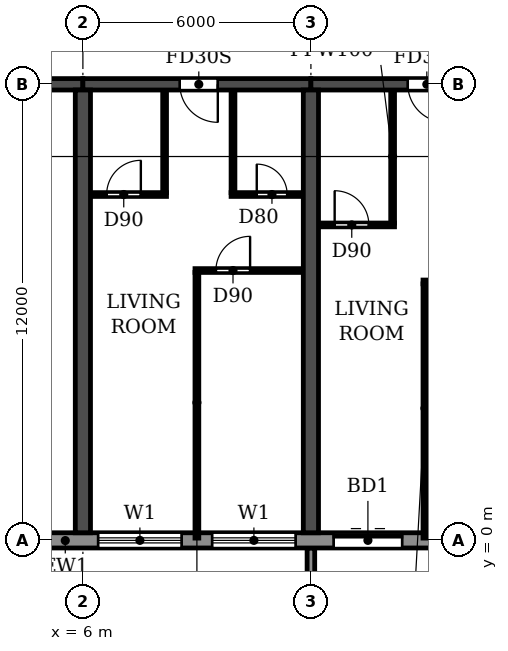
"""IFC4 building model, lengths in metres.
Left out: names, types, materials, properties, quantities, classifications, styles, units other than length and angle.
Written with IfcOpenShell. Run it as: python <this file> out.ifc"""

import sys

from ifc_helpers import new_model, si_unit, direction, frame, frame_2d, origin, place, context, subcontext, project, spatial, polyline, rectangle, outline, extrude, source, transform, mapped, element, fill, save


model = new_model("IFC4")
c1 = context("Model", 3, precision=1e-05, world=origin(), true_north=direction((0.0, 1.0)))
c2 = subcontext(c1, "Body", "Model", "MODEL_VIEW")
j1 = project(units=[si_unit("LENGTHUNIT", "METRE"), si_unit("PLANEANGLEUNIT", "RADIAN")], contexts=[c1])
p1 = place(None, origin())
s1 = spatial("IfcSite", under=j1, at=p1, CompositionType="ELEMENT")
p2 = place(p1, origin())
s2 = spatial("IfcBuilding", under=s1, at=p2, CompositionType="ELEMENT")
p3 = place(p2, frame((0.0, 0.0, 33.3)))
s3 = spatial("IfcBuildingStorey", under=s2, at=p3, CompositionType="ELEMENT", Elevation=33.3)
for number, where, z_axis, x_axis in (
    (1, (6.0, 0.2, 0.0), (0.0, 0.0, 1.0), (0.0, 1.0, 0.0)),
    (2, (12.0, 0.2, 0.0), (0.0, 0.0, 1.0), (0.0, 1.0, 0.0)),
):
    element("IfcWall", number, at=place(p3, frame(where, z_axis=z_axis, x_axis=x_axis)), inside=s3, PredefinedType="SHEAR", context=c2, shape_type="SweptSolid", body=[
        extrude(rectangle(XDim=11.65, YDim=0.4, at=frame_2d((5.825, 0.0))), origin(), (0.0, 0.0, 1.0), 3.05),
    ])
p4 = place(p3, frame((0.2, 12.0, 0.0), z_axis=(0.0, 0.0, 1.0), x_axis=(1.0, 0.0, 0.0)))
e3 = element("IfcWall", 3, at=p4, inside=s3, PredefinedType="SHEAR", context=c2, shape_type="SweptSolid", body=[
    extrude(rectangle(XDim=5.8, YDim=0.3, at=frame_2d((2.9, 0.0))), origin(), (0.0, 0.0, 1.0), 2.45),
])
p5 = place(p4, frame((2.3, 0.0, 0.0)))
e4 = element("IfcOpeningElement", 4, at=p5, cuts=e3, PredefinedType="OPENING", context=c2, shape_type="SweptSolid", body=[
    extrude(rectangle(XDim=1.0, YDim=2.1, at=frame_2d((0.5, 1.05))), frame((0.0, 0.16, 0.0), z_axis=(0.0, -1.0, 0.0), x_axis=(1.0, 0.0, 0.0)), (0.0, 0.0, 1.0), 0.32),
])
p6 = place(p3, frame((6.0, 12.0, 0.0), z_axis=(0.0, 0.0, 1.0), x_axis=(1.0, 0.0, 0.0)))
e5 = element("IfcWall", 5, at=p6, inside=s3, PredefinedType="SHEAR", context=c2, shape_type="SweptSolid", body=[
    extrude(rectangle(XDim=6.0, YDim=0.3, at=frame_2d((3.0, 0.0))), origin(), (0.0, 0.0, 1.0), 2.45),
])
p7 = place(p6, frame((2.55, 0.0, 0.0)))
e6 = element("IfcOpeningElement", 6, at=p7, cuts=e5, PredefinedType="OPENING", context=c2, shape_type="SweptSolid", body=[
    extrude(rectangle(XDim=1.0, YDim=2.1, at=frame_2d((0.5, 1.05))), frame((0.0, 0.16, 0.0), z_axis=(0.0, -1.0, 0.0), x_axis=(1.0, 0.0, 0.0)), (0.0, 0.0, 1.0), 0.32),
])
p8 = place(p3, frame((12.0, 12.0, 0.0), z_axis=(0.0, 0.0, 1.0), x_axis=(1.0, 0.0, 0.0)))
e7 = element("IfcWall", 7, at=p8, inside=s3, PredefinedType="SHEAR", context=c2, shape_type="SweptSolid", body=[
    extrude(rectangle(XDim=6.0, YDim=0.3, at=frame_2d((3.0, 0.0))), origin(), (0.0, 0.0, 1.0), 2.45),
])
p9 = place(p8, frame((2.55, 0.0, 0.0)))
e8 = element("IfcOpeningElement", 8, at=p9, cuts=e7, PredefinedType="OPENING", context=c2, shape_type="SweptSolid", body=[
    extrude(rectangle(XDim=1.0, YDim=2.1, at=frame_2d((0.5, 1.05))), frame((0.0, 0.16, 0.0), z_axis=(0.0, -1.0, 0.0), x_axis=(1.0, 0.0, 0.0)), (0.0, 0.0, 1.0), 0.32),
])
p10 = place(p3, frame((4.683, 0.0, 0.0), z_axis=(0.0, 0.0, 1.0), x_axis=(1.0, 0.0, 0.0)))
e9 = element("IfcWall", 9, at=p10, inside=s3, PredefinedType="STANDARD", context=c2, shape_type="SweptSolid", body=[
    extrude(rectangle(XDim=92.634, YDim=0.4, at=frame_2d((46.317, 0.0))), origin(), (0.0, 0.0, 1.0), 3.05),
])
p11 = place(p10, frame((1.717, 0.0, 0.9)))
e10 = element("IfcOpeningElement", 10, at=p11, cuts=e9, PredefinedType="OPENING", context=c2, shape_type="SweptSolid", body=[
    extrude(rectangle(XDim=2.2, YDim=1.5, at=frame_2d((1.1, 0.75))), frame((0.0, 0.21, 0.0), z_axis=(0.0, -1.0, 0.0), x_axis=(1.0, 0.0, 0.0)), (0.0, 0.0, 1.0), 0.42),
])
p12 = place(p10, frame((4.717, 0.0, 0.9)))
e11 = element("IfcOpeningElement", 11, at=p12, cuts=e9, PredefinedType="OPENING", context=c2, shape_type="SweptSolid", body=[
    extrude(rectangle(XDim=2.2, YDim=1.5, at=frame_2d((1.1, 0.75))), frame((0.0, 0.21, 0.0), z_axis=(0.0, -1.0, 0.0), x_axis=(1.0, 0.0, 0.0)), (0.0, 0.0, 1.0), 0.42),
])
p13 = place(p10, frame((7.917, 0.0, 0.0)))
e12 = element("IfcOpeningElement", 12, at=p13, cuts=e9, PredefinedType="OPENING", context=c2, shape_type="SweptSolid", body=[
    extrude(rectangle(XDim=1.8, YDim=2.4, at=frame_2d((0.9, 1.2))), frame((0.0, 0.21, 0.0), z_axis=(0.0, -1.0, 0.0), x_axis=(1.0, 0.0, 0.0)), (0.0, 0.0, 1.0), 0.42),
])
p14 = place(p10, frame((10.717, 0.0, 0.9)))
e13 = element("IfcOpeningElement", 13, at=p14, cuts=e9, PredefinedType="OPENING", context=c2, shape_type="SweptSolid", body=[
    extrude(rectangle(XDim=2.2, YDim=1.5, at=frame_2d((1.1, 0.75))), frame((0.0, 0.21, 0.0), z_axis=(0.0, -1.0, 0.0), x_axis=(1.0, 0.0, 0.0)), (0.0, 0.0, 1.0), 0.42),
])
p15 = place(p10, frame((13.717, 0.0, 0.9)))
e14 = element("IfcOpeningElement", 14, at=p15, cuts=e9, PredefinedType="OPENING", context=c2, shape_type="SweptSolid", body=[
    extrude(rectangle(XDim=2.2, YDim=1.5, at=frame_2d((1.1, 0.75))), frame((0.0, 0.21, 0.0), z_axis=(0.0, -1.0, 0.0), x_axis=(1.0, 0.0, 0.0)), (0.0, 0.0, 1.0), 0.42),
])
p16 = place(p10, frame((16.717, 0.0, 0.9)))
e15 = element("IfcOpeningElement", 15, at=p16, cuts=e9, PredefinedType="OPENING", context=c2, shape_type="SweptSolid", body=[
    extrude(rectangle(XDim=2.2, YDim=1.5, at=frame_2d((1.1, 0.75))), frame((0.0, 0.21, 0.0), z_axis=(0.0, -1.0, 0.0), x_axis=(1.0, 0.0, 0.0)), (0.0, 0.0, 1.0), 0.42),
])
p17 = place(p10, frame((19.717, 0.0, 0.9)))
e16 = element("IfcOpeningElement", 16, at=p17, cuts=e9, PredefinedType="OPENING", context=c2, shape_type="SweptSolid", body=[
    extrude(rectangle(XDim=2.2, YDim=1.5, at=frame_2d((1.1, 0.75))), frame((0.0, 0.21, 0.0), z_axis=(0.0, -1.0, 0.0), x_axis=(1.0, 0.0, 0.0)), (0.0, 0.0, 1.0), 0.42),
])
p18 = place(p10, frame((22.917, 0.0, 0.0)))
e17 = element("IfcOpeningElement", 17, at=p18, cuts=e9, PredefinedType="OPENING", context=c2, shape_type="SweptSolid", body=[
    extrude(rectangle(XDim=1.8, YDim=2.4, at=frame_2d((0.9, 1.2))), frame((0.0, 0.21, 0.0), z_axis=(0.0, -1.0, 0.0), x_axis=(1.0, 0.0, 0.0)), (0.0, 0.0, 1.0), 0.42),
])
p19 = place(p10, frame((25.717, 0.0, 0.9)))
e18 = element("IfcOpeningElement", 18, at=p19, cuts=e9, PredefinedType="OPENING", context=c2, shape_type="SweptSolid", body=[
    extrude(rectangle(XDim=2.2, YDim=1.5, at=frame_2d((1.1, 0.75))), frame((0.0, 0.21, 0.0), z_axis=(0.0, -1.0, 0.0), x_axis=(1.0, 0.0, 0.0)), (0.0, 0.0, 1.0), 0.42),
])
p20 = place(p10, frame((28.717, 0.0, 0.9)))
e19 = element("IfcOpeningElement", 19, at=p20, cuts=e9, PredefinedType="OPENING", context=c2, shape_type="SweptSolid", body=[
    extrude(rectangle(XDim=2.2, YDim=1.5, at=frame_2d((1.1, 0.75))), frame((0.0, 0.21, 0.0), z_axis=(0.0, -1.0, 0.0), x_axis=(1.0, 0.0, 0.0)), (0.0, 0.0, 1.0), 0.42),
])
p21 = place(p10, frame((31.717, 0.0, 0.9)))
e20 = element("IfcOpeningElement", 20, at=p21, cuts=e9, PredefinedType="OPENING", context=c2, shape_type="SweptSolid", body=[
    extrude(rectangle(XDim=2.2, YDim=1.5, at=frame_2d((1.1, 0.75))), frame((0.0, 0.21, 0.0), z_axis=(0.0, -1.0, 0.0), x_axis=(1.0, 0.0, 0.0)), (0.0, 0.0, 1.0), 0.42),
])
p22 = place(p10, frame((34.717, 0.0, 0.9)))
e21 = element("IfcOpeningElement", 21, at=p22, cuts=e9, PredefinedType="OPENING", context=c2, shape_type="SweptSolid", body=[
    extrude(rectangle(XDim=2.2, YDim=1.5, at=frame_2d((1.1, 0.75))), frame((0.0, 0.21, 0.0), z_axis=(0.0, -1.0, 0.0), x_axis=(1.0, 0.0, 0.0)), (0.0, 0.0, 1.0), 0.42),
])
p23 = place(p10, frame((37.717, 0.0, 0.9)))
e22 = element("IfcOpeningElement", 22, at=p23, cuts=e9, PredefinedType="OPENING", context=c2, shape_type="SweptSolid", body=[
    extrude(rectangle(XDim=2.2, YDim=1.5, at=frame_2d((1.1, 0.75))), frame((0.0, 0.21, 0.0), z_axis=(0.0, -1.0, 0.0), x_axis=(1.0, 0.0, 0.0)), (0.0, 0.0, 1.0), 0.42),
])
p24 = place(p10, frame((40.717, 0.0, 0.9)))
e23 = element("IfcOpeningElement", 23, at=p24, cuts=e9, PredefinedType="OPENING", context=c2, shape_type="SweptSolid", body=[
    extrude(rectangle(XDim=2.2, YDim=1.5, at=frame_2d((1.1, 0.75))), frame((0.0, 0.21, 0.0), z_axis=(0.0, -1.0, 0.0), x_axis=(1.0, 0.0, 0.0)), (0.0, 0.0, 1.0), 0.42),
])
p25 = place(p10, frame((43.717, 0.0, 0.9)))
e24 = element("IfcOpeningElement", 24, at=p25, cuts=e9, PredefinedType="OPENING", context=c2, shape_type="SweptSolid", body=[
    extrude(rectangle(XDim=2.2, YDim=1.5, at=frame_2d((1.1, 0.75))), frame((0.0, 0.21, 0.0), z_axis=(0.0, -1.0, 0.0), x_axis=(1.0, 0.0, 0.0)), (0.0, 0.0, 1.0), 0.42),
])
p26 = place(p10, frame((46.917, 0.0, 0.0)))
e25 = element("IfcOpeningElement", 25, at=p26, cuts=e9, PredefinedType="OPENING", context=c2, shape_type="SweptSolid", body=[
    extrude(rectangle(XDim=1.8, YDim=2.4, at=frame_2d((0.9, 1.2))), frame((0.0, 0.21, 0.0), z_axis=(0.0, -1.0, 0.0), x_axis=(1.0, 0.0, 0.0)), (0.0, 0.0, 1.0), 0.42),
])
p27 = place(p10, frame((49.717, 0.0, 0.9)))
e26 = element("IfcOpeningElement", 26, at=p27, cuts=e9, PredefinedType="OPENING", context=c2, shape_type="SweptSolid", body=[
    extrude(rectangle(XDim=2.2, YDim=1.5, at=frame_2d((1.1, 0.75))), frame((0.0, 0.21, 0.0), z_axis=(0.0, -1.0, 0.0), x_axis=(1.0, 0.0, 0.0)), (0.0, 0.0, 1.0), 0.42),
])
p28 = place(p10, frame((52.717, 0.0, 0.9)))
e27 = element("IfcOpeningElement", 27, at=p28, cuts=e9, PredefinedType="OPENING", context=c2, shape_type="SweptSolid", body=[
    extrude(rectangle(XDim=2.2, YDim=1.5, at=frame_2d((1.1, 0.75))), frame((0.0, 0.21, 0.0), z_axis=(0.0, -1.0, 0.0), x_axis=(1.0, 0.0, 0.0)), (0.0, 0.0, 1.0), 0.42),
])
p29 = place(p10, frame((55.717, 0.0, 0.9)))
e28 = element("IfcOpeningElement", 28, at=p29, cuts=e9, PredefinedType="OPENING", context=c2, shape_type="SweptSolid", body=[
    extrude(rectangle(XDim=2.2, YDim=1.5, at=frame_2d((1.1, 0.75))), frame((0.0, 0.21, 0.0), z_axis=(0.0, -1.0, 0.0), x_axis=(1.0, 0.0, 0.0)), (0.0, 0.0, 1.0), 0.42),
])
p30 = place(p10, frame((58.917, 0.0, 0.0)))
e29 = element("IfcOpeningElement", 29, at=p30, cuts=e9, PredefinedType="OPENING", context=c2, shape_type="SweptSolid", body=[
    extrude(rectangle(XDim=1.8, YDim=2.4, at=frame_2d((0.9, 1.2))), frame((0.0, 0.21, 0.0), z_axis=(0.0, -1.0, 0.0), x_axis=(1.0, 0.0, 0.0)), (0.0, 0.0, 1.0), 0.42),
])
p31 = place(p10, frame((61.717, 0.0, 0.9)))
e30 = element("IfcOpeningElement", 30, at=p31, cuts=e9, PredefinedType="OPENING", context=c2, shape_type="SweptSolid", body=[
    extrude(rectangle(XDim=2.2, YDim=1.5, at=frame_2d((1.1, 0.75))), frame((0.0, 0.21, 0.0), z_axis=(0.0, -1.0, 0.0), x_axis=(1.0, 0.0, 0.0)), (0.0, 0.0, 1.0), 0.42),
])
p32 = place(p10, frame((64.717, 0.0, 0.9)))
e31 = element("IfcOpeningElement", 31, at=p32, cuts=e9, PredefinedType="OPENING", context=c2, shape_type="SweptSolid", body=[
    extrude(rectangle(XDim=2.2, YDim=1.5, at=frame_2d((1.1, 0.75))), frame((0.0, 0.21, 0.0), z_axis=(0.0, -1.0, 0.0), x_axis=(1.0, 0.0, 0.0)), (0.0, 0.0, 1.0), 0.42),
])
p33 = place(p10, frame((67.717, 0.0, 0.9)))
e32 = element("IfcOpeningElement", 32, at=p33, cuts=e9, PredefinedType="OPENING", context=c2, shape_type="SweptSolid", body=[
    extrude(rectangle(XDim=2.2, YDim=1.5, at=frame_2d((1.1, 0.75))), frame((0.0, 0.21, 0.0), z_axis=(0.0, -1.0, 0.0), x_axis=(1.0, 0.0, 0.0)), (0.0, 0.0, 1.0), 0.42),
])
p34 = place(p10, frame((70.917, 0.0, 0.0)))
e33 = element("IfcOpeningElement", 33, at=p34, cuts=e9, PredefinedType="OPENING", context=c2, shape_type="SweptSolid", body=[
    extrude(rectangle(XDim=1.8, YDim=2.4, at=frame_2d((0.9, 1.2))), frame((0.0, 0.21, 0.0), z_axis=(0.0, -1.0, 0.0), x_axis=(1.0, 0.0, 0.0)), (0.0, 0.0, 1.0), 0.42),
])
p35 = place(p10, frame((73.717, 0.0, 0.9)))
e34 = element("IfcOpeningElement", 34, at=p35, cuts=e9, PredefinedType="OPENING", context=c2, shape_type="SweptSolid", body=[
    extrude(rectangle(XDim=2.2, YDim=1.5, at=frame_2d((1.1, 0.75))), frame((0.0, 0.21, 0.0), z_axis=(0.0, -1.0, 0.0), x_axis=(1.0, 0.0, 0.0)), (0.0, 0.0, 1.0), 0.42),
])
p36 = place(p10, frame((76.717, 0.0, 0.9)))
e35 = element("IfcOpeningElement", 35, at=p36, cuts=e9, PredefinedType="OPENING", context=c2, shape_type="SweptSolid", body=[
    extrude(rectangle(XDim=2.2, YDim=1.5, at=frame_2d((1.1, 0.75))), frame((0.0, 0.21, 0.0), z_axis=(0.0, -1.0, 0.0), x_axis=(1.0, 0.0, 0.0)), (0.0, 0.0, 1.0), 0.42),
])
p37 = place(p10, frame((79.717, 0.0, 0.9)))
e36 = element("IfcOpeningElement", 36, at=p37, cuts=e9, PredefinedType="OPENING", context=c2, shape_type="SweptSolid", body=[
    extrude(rectangle(XDim=2.2, YDim=1.5, at=frame_2d((1.1, 0.75))), frame((0.0, 0.21, 0.0), z_axis=(0.0, -1.0, 0.0), x_axis=(1.0, 0.0, 0.0)), (0.0, 0.0, 1.0), 0.42),
])
p38 = place(p10, frame((82.717, 0.0, 0.9)))
e37 = element("IfcOpeningElement", 37, at=p38, cuts=e9, PredefinedType="OPENING", context=c2, shape_type="SweptSolid", body=[
    extrude(rectangle(XDim=2.2, YDim=1.5, at=frame_2d((1.1, 0.75))), frame((0.0, 0.21, 0.0), z_axis=(0.0, -1.0, 0.0), x_axis=(1.0, 0.0, 0.0)), (0.0, 0.0, 1.0), 0.42),
])
p39 = place(p10, frame((85.717, 0.0, 0.9)))
e38 = element("IfcOpeningElement", 38, at=p39, cuts=e9, PredefinedType="OPENING", context=c2, shape_type="SweptSolid", body=[
    extrude(rectangle(XDim=2.2, YDim=1.5, at=frame_2d((1.1, 0.75))), frame((0.0, 0.21, 0.0), z_axis=(0.0, -1.0, 0.0), x_axis=(1.0, 0.0, 0.0)), (0.0, 0.0, 1.0), 0.42),
])
p40 = place(p10, frame((88.717, 0.0, 0.9)))
e39 = element("IfcOpeningElement", 39, at=p40, cuts=e9, PredefinedType="OPENING", context=c2, shape_type="SweptSolid", body=[
    extrude(rectangle(XDim=2.2, YDim=1.5, at=frame_2d((1.1, 0.75))), frame((0.0, 0.21, 0.0), z_axis=(0.0, -1.0, 0.0), x_axis=(1.0, 0.0, 0.0)), (0.0, 0.0, 1.0), 0.42),
])
m1 = source(origin(), c2, "Body", "SweptSolid", [
    extrude(outline(polyline([(0.0, 0.0), (0.2, 0.0), (0.2, 1.65), (0.0, 1.65), (0.0, 0.0)])), origin(), (0.0, 0.0, 1.0), 3.1),
])
p41 = place(p3, frame((11.9, -1.85, 0.0)))
e40 = element("IfcWall", 40, at=p41, inside=s3, PredefinedType="STANDARD", context=c2, shape_type="MappedRepresentation", body=[
    mapped(m1, transform((0.0, 0.0, 0.0))),
])
p42 = place(p3, frame((14.95, 6.8, 0.0), z_axis=(0.0, 0.0, 1.0), x_axis=(1.0, 0.0, 0.0)))
e41 = element("IfcWall", 41, at=p42, inside=s3, PredefinedType="PARTITIONING", context=c2, shape_type="SweptSolid", body=[
    extrude(rectangle(XDim=2.84, YDim=0.1, at=frame_2d((1.42, 0.0))), origin(), (0.0, 0.0, 1.0), 3.05),
])
p43 = place(p42, frame((1.65, 0.0, 0.0)))
e42 = element("IfcOpeningElement", 42, at=p43, cuts=e41, PredefinedType="OPENING", context=c2, shape_type="SweptSolid", body=[
    extrude(rectangle(XDim=0.9, YDim=2.1, at=frame_2d((0.45, 1.05))), frame((0.0, 0.06, 0.0), z_axis=(0.0, -1.0, 0.0), x_axis=(1.0, 0.0, 0.0)), (0.0, 0.0, 1.0), 0.12),
])
p44 = place(p3, frame((8.95, 7.1, 0.0), z_axis=(0.0, 0.0, 1.0), x_axis=(1.0, 0.0, 0.0)))
e43 = element("IfcWall", 43, at=p44, inside=s3, PredefinedType="PARTITIONING", context=c2, shape_type="SweptSolid", body=[
    extrude(rectangle(XDim=2.84, YDim=0.1, at=frame_2d((1.42, 0.0))), origin(), (0.0, 0.0, 1.0), 3.05),
])
p45 = place(p44, frame((0.55, 0.0, 0.0)))
e44 = element("IfcOpeningElement", 44, at=p45, cuts=e43, PredefinedType="OPENING", context=c2, shape_type="SweptSolid", body=[
    extrude(rectangle(XDim=0.9, YDim=2.1, at=frame_2d((0.45, 1.05))), frame((0.0, 0.06, 0.0), z_axis=(0.0, -1.0, 0.0), x_axis=(1.0, 0.0, 0.0)), (0.0, 0.0, 1.0), 0.12),
])
p46 = place(p3, frame((12.21, 8.3, 0.0), z_axis=(0.0, 0.0, 1.0), x_axis=(1.0, 0.0, 0.0)))
e45 = element("IfcWall", 45, at=p46, inside=s3, PredefinedType="PARTITIONING", context=c2, shape_type="SweptSolid", body=[
    extrude(rectangle(XDim=1.99, YDim=0.1, at=frame_2d((0.995, 0.0))), origin(), (0.0, 0.0, 1.0), 3.05),
])
p47 = place(p46, frame((0.415, 0.0, 0.0)))
e46 = element("IfcOpeningElement", 46, at=p47, cuts=e45, PredefinedType="OPENING", context=c2, shape_type="SweptSolid", body=[
    extrude(rectangle(XDim=0.9, YDim=2.1, at=frame_2d((0.45, 1.05))), frame((0.0, 0.06, 0.0), z_axis=(0.0, -1.0, 0.0), x_axis=(1.0, 0.0, 0.0)), (0.0, 0.0, 1.0), 0.12),
])
p48 = place(p3, frame((6.21, 9.1, 0.0), z_axis=(0.0, 0.0, 1.0), x_axis=(1.0, 0.0, 0.0)))
e47 = element("IfcWall", 47, at=p48, inside=s3, PredefinedType="PARTITIONING", context=c2, shape_type="SweptSolid", body=[
    extrude(rectangle(XDim=1.99, YDim=0.1, at=frame_2d((0.995, 0.0))), origin(), (0.0, 0.0, 1.0), 3.05),
])
p49 = place(p48, frame((0.415, 0.0, 0.0)))
e48 = element("IfcOpeningElement", 48, at=p49, cuts=e47, PredefinedType="OPENING", context=c2, shape_type="SweptSolid", body=[
    extrude(rectangle(XDim=0.9, YDim=2.1, at=frame_2d((0.45, 1.05))), frame((0.0, 0.06, 0.0), z_axis=(0.0, -1.0, 0.0), x_axis=(1.0, 0.0, 0.0)), (0.0, 0.0, 1.0), 0.12),
])
p50 = place(p3, frame((9.9, 9.1, 0.0), z_axis=(0.0, 0.0, 1.0), x_axis=(1.0, 0.0, 0.0)))
e49 = element("IfcWall", 49, at=p50, inside=s3, PredefinedType="PARTITIONING", context=c2, shape_type="SweptSolid", body=[
    extrude(rectangle(XDim=1.89, YDim=0.1, at=frame_2d((0.945, 0.0))), origin(), (0.0, 0.0, 1.0), 3.05),
])
p51 = place(p50, frame((0.675, 0.0, 0.0)))
e50 = element("IfcOpeningElement", 50, at=p51, cuts=e49, PredefinedType="OPENING", context=c2, shape_type="SweptSolid", body=[
    extrude(rectangle(XDim=0.8, YDim=2.1, at=frame_2d((0.4, 1.05))), frame((0.0, 0.06, 0.0), z_axis=(0.0, -1.0, 0.0), x_axis=(1.0, 0.0, 0.0)), (0.0, 0.0, 1.0), 0.12),
])
p52 = place(p3, frame((8.15, 9.15, 0.0), z_axis=(0.0, 0.0, 1.0), x_axis=(0.0, 1.0, 0.0)))
e51 = element("IfcWall", 51, at=p52, inside=s3, PredefinedType="PARTITIONING", context=c2, shape_type="SweptSolid", body=[
    extrude(rectangle(XDim=2.69, YDim=0.1, at=frame_2d((1.345, 0.0))), origin(), (0.0, 0.0, 1.0), 3.05),
])
p53 = place(p3, frame((9.0, 0.06, 0.0), z_axis=(0.0, 0.0, 1.0), x_axis=(0.0, 1.0, 0.0)))
e52 = element("IfcWall", 52, at=p53, inside=s3, PredefinedType="PARTITIONING", context=c2, shape_type="SweptSolid", body=[
    extrude(rectangle(XDim=6.99, YDim=0.1, at=frame_2d((3.495, 0.0))), origin(), (0.0, 0.0, 1.0), 3.05),
])
p54 = place(p3, frame((9.95, 9.15, 0.0), z_axis=(0.0, 0.0, 1.0), x_axis=(0.0, 1.0, 0.0)))
e53 = element("IfcWall", 53, at=p54, inside=s3, PredefinedType="PARTITIONING", context=c2, shape_type="SweptSolid", body=[
    extrude(rectangle(XDim=2.69, YDim=0.1, at=frame_2d((1.345, 0.0))), origin(), (0.0, 0.0, 1.0), 3.05),
])
p55 = place(p3, frame((14.15, 8.35, 0.0), z_axis=(0.0, 0.0, 1.0), x_axis=(0.0, 1.0, 0.0)))
e54 = element("IfcWall", 54, at=p55, inside=s3, PredefinedType="PARTITIONING", context=c2, shape_type="SweptSolid", body=[
    extrude(rectangle(XDim=3.49, YDim=0.1, at=frame_2d((1.745, 0.0))), origin(), (0.0, 0.0, 1.0), 3.05),
])
p56 = place(p3, frame((15.0, 0.06, 0.0), z_axis=(0.0, 0.0, 1.0), x_axis=(0.0, 1.0, 0.0)))
e55 = element("IfcWall", 55, at=p56, inside=s3, PredefinedType="PARTITIONING", context=c2, shape_type="SweptSolid", body=[
    extrude(rectangle(XDim=6.69, YDim=0.1, at=frame_2d((3.345, 0.0))), origin(), (0.0, 0.0, 1.0), 3.05),
])
p57 = place(p11, origin())
e56 = element("IfcWindow", 56, at=p57, inside=s3, PartitioningType="DOUBLE_PANEL_HORIZONTAL", PredefinedType="WINDOW", context=c2, shape_type="SweptSolid", body=[
    extrude(rectangle(XDim=2.2, YDim=1.5, at=frame_2d((1.1, 0.75))), frame((0.0, 0.03, 0.0), z_axis=(0.0, -1.0, 0.0), x_axis=(1.0, 0.0, 0.0)), (0.0, 0.0, 1.0), 0.06),
])
fill(e10, e56)
p58 = place(p12, origin())
e57 = element("IfcWindow", 57, at=p58, inside=s3, PartitioningType="DOUBLE_PANEL_HORIZONTAL", PredefinedType="WINDOW", context=c2, shape_type="SweptSolid", body=[
    extrude(rectangle(XDim=2.2, YDim=1.5, at=frame_2d((1.1, 0.75))), frame((0.0, 0.03, 0.0), z_axis=(0.0, -1.0, 0.0), x_axis=(1.0, 0.0, 0.0)), (0.0, 0.0, 1.0), 0.06),
])
fill(e11, e57)
p59 = place(p13, origin())
e58 = element("IfcDoor", 58, at=p59, inside=s3, OperationType="DOUBLE_DOOR_SLIDING", PredefinedType="DOOR", context=c2, shape_type="SweptSolid", body=[
    extrude(rectangle(XDim=1.8, YDim=2.4, at=frame_2d((0.9, 1.2))), frame((0.0, 0.025, 0.0), z_axis=(0.0, -1.0, 0.0), x_axis=(1.0, 0.0, 0.0)), (0.0, 0.0, 1.0), 0.05),
])
fill(e12, e58)
p60 = place(p49, origin())
e59 = element("IfcDoor", 59, at=p60, inside=s3, OperationType="SINGLE_SWING_RIGHT", PredefinedType="DOOR", context=c2, shape_type="SweptSolid", body=[
    extrude(rectangle(XDim=0.9, YDim=2.1, at=frame_2d((0.45, 1.05))), frame((0.0, 0.025, 0.0), z_axis=(0.0, -1.0, 0.0), x_axis=(1.0, 0.0, 0.0)), (0.0, 0.0, 1.0), 0.05),
])
fill(e48, e59)
p61 = place(p7, frame((1.0, 0.0, 0.0), z_axis=(0.0, 0.0, 1.0), x_axis=(-1.0, 0.0, 0.0)))
e60 = element("IfcDoor", 60, at=p61, inside=s3, OperationType="SINGLE_SWING_LEFT", PredefinedType="DOOR", context=c2, shape_type="SweptSolid", body=[
    extrude(rectangle(XDim=1.0, YDim=2.1, at=frame_2d((0.5, 1.05))), frame((0.0, 0.025, 0.0), z_axis=(0.0, -1.0, 0.0), x_axis=(1.0, 0.0, 0.0)), (0.0, 0.0, 1.0), 0.05),
])
fill(e6, e60)
p62 = place(p45, origin())
e61 = element("IfcDoor", 61, at=p62, inside=s3, OperationType="SINGLE_SWING_RIGHT", PredefinedType="DOOR", context=c2, shape_type="SweptSolid", body=[
    extrude(rectangle(XDim=0.9, YDim=2.1, at=frame_2d((0.45, 1.05))), frame((0.0, 0.025, 0.0), z_axis=(0.0, -1.0, 0.0), x_axis=(1.0, 0.0, 0.0)), (0.0, 0.0, 1.0), 0.05),
])
fill(e44, e61)
p63 = place(p51, origin())
e62 = element("IfcDoor", 62, at=p63, inside=s3, OperationType="SINGLE_SWING_LEFT", PredefinedType="DOOR", context=c2, shape_type="SweptSolid", body=[
    extrude(rectangle(XDim=0.8, YDim=2.1, at=frame_2d((0.4, 1.05))), frame((0.0, 0.025, 0.0), z_axis=(0.0, -1.0, 0.0), x_axis=(1.0, 0.0, 0.0)), (0.0, 0.0, 1.0), 0.05),
])
fill(e50, e62)
p64 = place(p47, origin())
e63 = element("IfcDoor", 63, at=p64, inside=s3, OperationType="SINGLE_SWING_LEFT", PredefinedType="DOOR", context=c2, shape_type="SweptSolid", body=[
    extrude(rectangle(XDim=0.9, YDim=2.1, at=frame_2d((0.45, 1.05))), frame((0.0, 0.025, 0.0), z_axis=(0.0, -1.0, 0.0), x_axis=(1.0, 0.0, 0.0)), (0.0, 0.0, 1.0), 0.05),
])
fill(e46, e63)
p65 = place(p9, frame((1.0, 0.0, 0.0), z_axis=(0.0, 0.0, 1.0), x_axis=(-1.0, 0.0, 0.0)))
e64 = element("IfcDoor", 64, at=p65, inside=s3, OperationType="SINGLE_SWING_LEFT", PredefinedType="DOOR", context=c2, shape_type="SweptSolid", body=[
    extrude(rectangle(XDim=1.0, YDim=2.1, at=frame_2d((0.5, 1.05))), frame((0.0, 0.025, 0.0), z_axis=(0.0, -1.0, 0.0), x_axis=(1.0, 0.0, 0.0)), (0.0, 0.0, 1.0), 0.05),
])
fill(e8, e64)
save(model, sys.argv[1])
